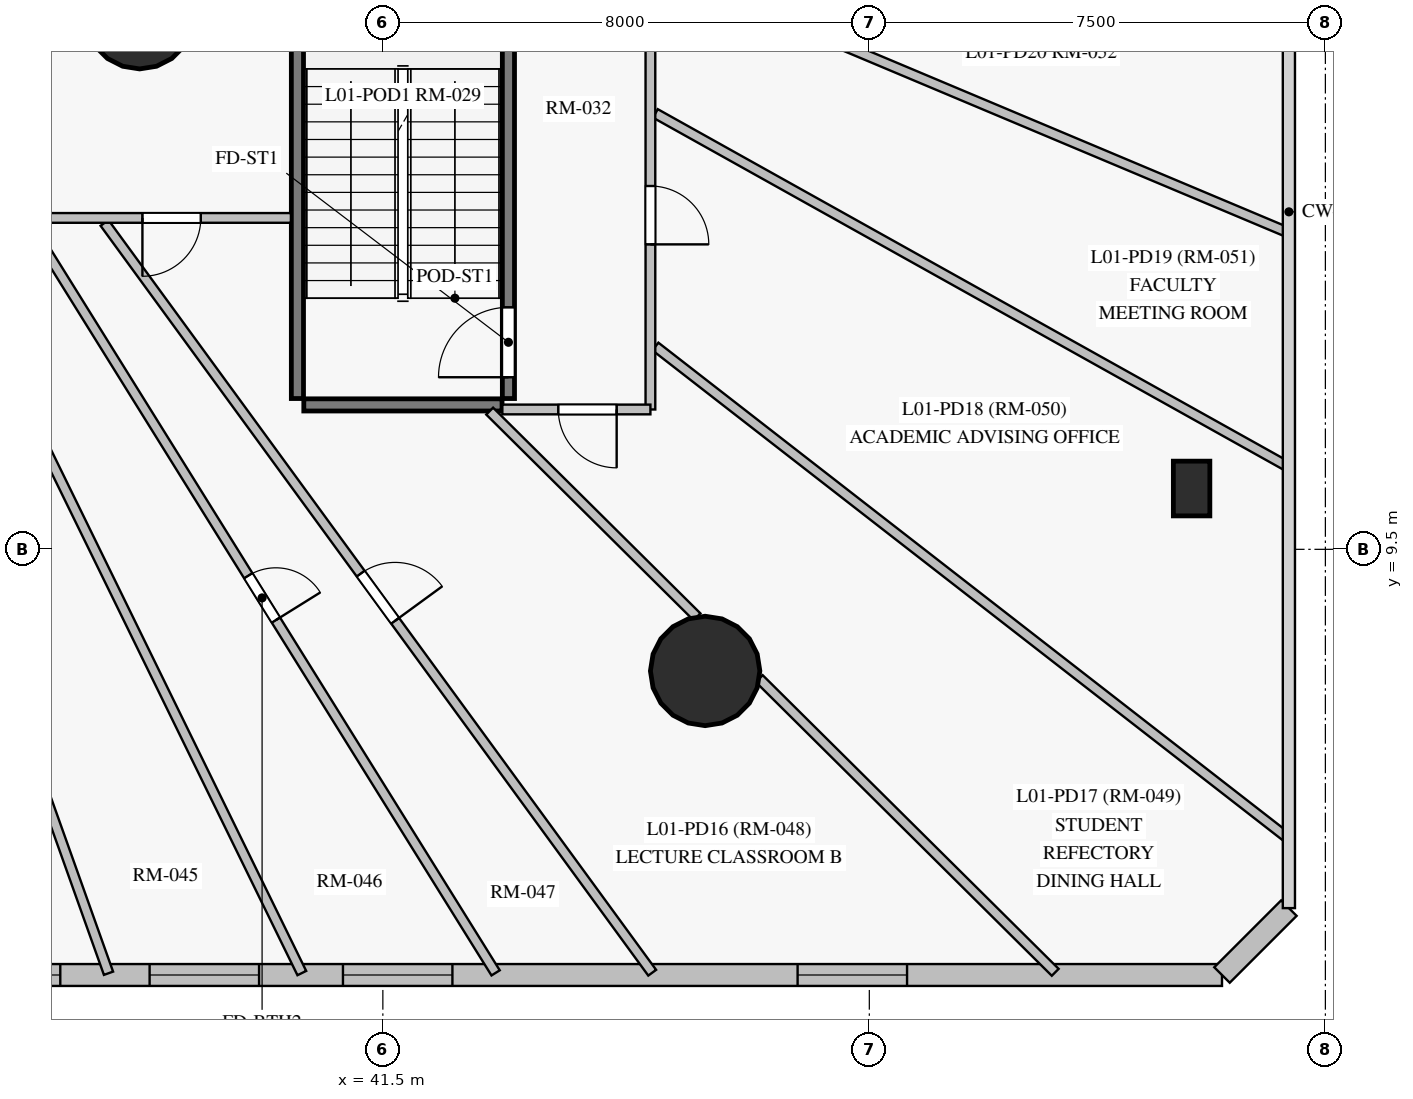
"""IFC4 building model, lengths in metres.
Left out: names, types, materials, properties, quantities, classifications, styles, units other than length and angle.
Written with IfcOpenShell. Run it as: python <this file> out.ifc"""

import sys

from ifc_helpers import new_model, si_unit, direction, frame, frame_2d, origin, origin_with_axes, origin_2d, place, context, subcontext, project, spatial, rectangle, circle, extrude, source, transform, mapped, element, fill, save


model = new_model("IFC4")
c1 = context("Model", 3, precision=1e-05, world=origin(), true_north=direction((0.0, 1.0)))
c2 = subcontext(c1, "Body", "Model", "MODEL_VIEW")
j1 = project(units=[si_unit("LENGTHUNIT", "METRE"), si_unit("PLANEANGLEUNIT", "RADIAN")], contexts=[c1])
p1 = place(None, origin())
s1 = spatial("IfcSite", under=j1, at=p1, CompositionType="ELEMENT")
p2 = place(p1, origin())
s2 = spatial("IfcBuilding", under=s1, at=p2, CompositionType="ELEMENT")
p3 = place(p2, frame((0.0, 0.0, 4.5)))
s3 = spatial("IfcBuildingStorey", under=s2, at=p3, CompositionType="ELEMENT", Elevation=4.5)
m1 = source(origin_with_axes(), c2, "Body", "SweptSolid", [
    extrude(circle(Radius=0.9, at=origin_2d()), origin(), (0.0, 0.0, 1.0), 4.5),
])
for number, where, z_axis, x_axis in (
    (1, (37.5, 18.3, 0.0), (0.0, 0.0, 1.0), (1.0, 0.0, 0.0)),
    (2, (46.8, 7.5, 0.0), (0.0, 0.0, 1.0), (1.0, 0.0, 0.0)),
):
    element("IfcColumn", number, at=place(p3, frame(where, z_axis=z_axis, x_axis=x_axis)), inside=s3, PredefinedType="COLUMN", context=c2, shape_type="MappedRepresentation", body=[
        mapped(m1, transform((0.0, 0.0, 0.0), scale=1.0)),
    ])
m2 = source(origin_with_axes(), c2, "Body", "SweptSolid", [
    extrude(rectangle(XDim=0.6, YDim=0.9, at=origin_2d()), origin(), (0.0, 0.0, 1.0), 4.5),
])
p4 = place(p3, frame((54.8, 10.5, 0.0), z_axis=(0.0, 0.0, 1.0), x_axis=(1.0, 0.0, 0.0)))
e3 = element("IfcColumn", 3, at=p4, inside=s3, PredefinedType="PILASTER", context=c2, shape_type="MappedRepresentation", body=[
    mapped(m2, transform((0.0, 0.0, 0.0), scale=1.0)),
])
p5 = place(p3, frame((3.45, 2.5, 0.0), z_axis=(0.0, 0.0, 1.0), x_axis=(1.0, 0.0, 0.0)))
e4 = element("IfcWall", 4, at=p5, inside=s3, PredefinedType="SOLIDWALL", context=c2, shape_type="SweptSolid", body=[
    extrude(rectangle(XDim=51.85, YDim=0.36, at=frame_2d((25.925, 0.0))), origin(), (0.0, 0.0, 1.0), 4.2),
])
p6 = place(p5, frame((1.516, 0.0, 0.85)))
e5 = element("IfcOpeningElement", 5, at=p6, cuts=e4, PredefinedType="OPENING", context=c2, shape_type="SweptSolid", body=[
    extrude(rectangle(XDim=1.8, YDim=2.2, at=frame_2d((0.9, 1.1))), frame((0.0, 0.19, 0.0), z_axis=(0.0, -1.0, 0.0), x_axis=(1.0, 0.0, 0.0)), (0.0, 0.0, 1.0), 0.38),
])
p7 = place(p5, frame((6.037, 0.0, 0.85)))
e6 = element("IfcOpeningElement", 6, at=p7, cuts=e4, PredefinedType="OPENING", context=c2, shape_type="SweptSolid", body=[
    extrude(rectangle(XDim=1.8, YDim=2.2, at=frame_2d((0.9, 1.1))), frame((0.0, 0.19, 0.0), z_axis=(0.0, -1.0, 0.0), x_axis=(1.0, 0.0, 0.0)), (0.0, 0.0, 1.0), 0.38),
])
p8 = place(p5, frame((12.611, 0.0, 0.85)))
e7 = element("IfcOpeningElement", 7, at=p8, cuts=e4, PredefinedType="OPENING", context=c2, shape_type="SweptSolid", body=[
    extrude(rectangle(XDim=1.8, YDim=2.2, at=frame_2d((0.9, 1.1))), frame((0.0, 0.19, 0.0), z_axis=(0.0, -1.0, 0.0), x_axis=(1.0, 0.0, 0.0)), (0.0, 0.0, 1.0), 0.38),
])
p9 = place(p5, frame((18.95, 0.0, 0.85)))
e8 = element("IfcOpeningElement", 8, at=p9, cuts=e4, PredefinedType="OPENING", context=c2, shape_type="SweptSolid", body=[
    extrude(rectangle(XDim=1.8, YDim=2.2, at=frame_2d((0.9, 1.1))), frame((0.0, 0.19, 0.0), z_axis=(0.0, -1.0, 0.0), x_axis=(1.0, 0.0, 0.0)), (0.0, 0.0, 1.0), 0.38),
])
p10 = place(p5, frame((25.523, 0.0, 0.85)))
e9 = element("IfcOpeningElement", 9, at=p10, cuts=e4, PredefinedType="OPENING", context=c2, shape_type="SweptSolid", body=[
    extrude(rectangle(XDim=1.8, YDim=2.2, at=frame_2d((0.9, 1.1))), frame((0.0, 0.19, 0.0), z_axis=(0.0, -1.0, 0.0), x_axis=(1.0, 0.0, 0.0)), (0.0, 0.0, 1.0), 0.38),
])
p11 = place(p5, frame((30.945, 0.0, 0.85)))
e10 = element("IfcOpeningElement", 10, at=p11, cuts=e4, PredefinedType="OPENING", context=c2, shape_type="SweptSolid", body=[
    extrude(rectangle(XDim=1.8, YDim=2.2, at=frame_2d((0.9, 1.1))), frame((0.0, 0.19, 0.0), z_axis=(0.0, -1.0, 0.0), x_axis=(1.0, 0.0, 0.0)), (0.0, 0.0, 1.0), 0.38),
])
p12 = place(p5, frame((34.214, 0.0, 0.85)))
e11 = element("IfcOpeningElement", 11, at=p12, cuts=e4, PredefinedType="OPENING", context=c2, shape_type="SweptSolid", body=[
    extrude(rectangle(XDim=1.8, YDim=2.2, at=frame_2d((0.9, 1.1))), frame((0.0, 0.19, 0.0), z_axis=(0.0, -1.0, 0.0), x_axis=(1.0, 0.0, 0.0)), (0.0, 0.0, 1.0), 0.38),
])
p13 = place(p5, frame((37.394, 0.0, 0.85)))
e12 = element("IfcOpeningElement", 12, at=p13, cuts=e4, PredefinedType="OPENING", context=c2, shape_type="SweptSolid", body=[
    extrude(rectangle(XDim=1.8, YDim=2.2, at=frame_2d((0.9, 1.1))), frame((0.0, 0.19, 0.0), z_axis=(0.0, -1.0, 0.0), x_axis=(1.0, 0.0, 0.0)), (0.0, 0.0, 1.0), 0.38),
])
p14 = place(p5, frame((44.871, 0.0, 0.85)))
e13 = element("IfcOpeningElement", 13, at=p14, cuts=e4, PredefinedType="OPENING", context=c2, shape_type="SweptSolid", body=[
    extrude(rectangle(XDim=1.8, YDim=2.2, at=frame_2d((0.9, 1.1))), frame((0.0, 0.19, 0.0), z_axis=(0.0, -1.0, 0.0), x_axis=(1.0, 0.0, 0.0)), (0.0, 0.0, 1.0), 0.38),
])
p15 = place(p3, frame((55.3, 2.5, 0.0), z_axis=(0.0, 0.0, 1.0), x_axis=(0.707028305322, 0.707185248342, 0.0)))
e14 = element("IfcWall", 14, at=p15, inside=s3, PredefinedType="SOLIDWALL", context=c2, shape_type="SweptSolid", body=[
    extrude(rectangle(XDim=1.556, YDim=0.36, at=frame_2d((0.778, 0.0))), origin(), (0.0, 0.0, 1.0), 4.2),
])
p16 = place(p3, frame((40.095, 11.98, 0.0), z_axis=(0.0, 0.0, 1.0), x_axis=(0.0, 1.0, 0.0)))
e15 = element("IfcWall", 15, at=p16, inside=s3, PredefinedType="SHEAR", context=c2, shape_type="SweptSolid", body=[
    extrude(rectangle(XDim=7.35, YDim=0.2, at=frame_2d((3.675, 0.0))), origin(), (0.0, 0.0, 1.0), 4.2),
])
p17 = place(p3, frame((43.565, 11.98, 0.0), z_axis=(0.0, 0.0, 1.0), x_axis=(0.0, 1.0, 0.0)))
e16 = element("IfcWall", 16, at=p17, inside=s3, PredefinedType="SHEAR", context=c2, shape_type="SweptSolid", body=[
    extrude(rectangle(XDim=7.35, YDim=0.2, at=frame_2d((3.675, 0.0))), origin(), (0.0, 0.0, 1.0), 4.2),
])
p18 = place(p17, frame((0.35, 0.0, 0.0)))
e17 = element("IfcOpeningElement", 17, at=p18, cuts=e16, PredefinedType="OPENING", context=c2, shape_type="SweptSolid", body=[
    extrude(rectangle(XDim=1.15, YDim=2.15, at=frame_2d((0.575, 1.075))), frame((0.0, 0.11, 0.0), z_axis=(0.0, -1.0, 0.0), x_axis=(1.0, 0.0, 0.0)), (0.0, 0.0, 1.0), 0.22),
])
p19 = place(p3, frame((40.2, 11.875, 0.0), z_axis=(0.0, 0.0, 1.0), x_axis=(1.0, 0.0, 0.0)))
e18 = element("IfcWall", 18, at=p19, inside=s3, PredefinedType="SHEAR", context=c2, shape_type="SweptSolid", body=[
    extrude(rectangle(XDim=3.26, YDim=0.2, at=frame_2d((1.63, 0.0))), origin(), (0.0, 0.0, 1.0), 4.2),
])
p20 = place(p3, frame((40.918, 21.214, 0.0), z_axis=(0.0, 0.0, 1.0), x_axis=(0.921837584327, -0.387576402947, 0.0)))
e19 = element("IfcWall", 19, at=p20, inside=s3, PredefinedType="PARTITIONING", context=c2, shape_type="SweptSolid", body=[
    extrude(rectangle(XDim=16.762, YDim=0.16, at=frame_2d((8.381, 0.0))), origin(), (0.0, 0.0, 1.0), 4.2),
])
p21 = place(p20, frame((7.881, 0.0, 0.0)))
e20 = element("IfcOpeningElement", 20, at=p21, cuts=e19, PredefinedType="OPENING", context=c2, shape_type="SweptSolid", body=[
    extrude(rectangle(XDim=0.96, YDim=2.15, at=frame_2d((0.48, 1.075))), frame((0.0, 0.09, 0.0), z_axis=(0.0, -1.0, 0.0), x_axis=(1.0, 0.0, 0.0)), (0.0, 0.0, 1.0), 0.18),
])
p22 = place(p3, frame((36.923, 14.868, 0.0), z_axis=(0.0, 0.0, 1.0), x_axis=(0.589855025389, -0.80750916343, 0.0)))
e21 = element("IfcWall", 21, at=p22, inside=s3, PredefinedType="PARTITIONING", context=c2, shape_type="SweptSolid", body=[
    extrude(rectangle(XDim=15.27, YDim=0.16, at=frame_2d((7.635, 0.0))), origin(), (0.0, 0.0, 1.0), 4.2),
])
p23 = place(p22, frame((7.142, 0.0, 0.0)))
e22 = element("IfcOpeningElement", 22, at=p23, cuts=e21, PredefinedType="OPENING", context=c2, shape_type="SweptSolid", body=[
    extrude(rectangle(XDim=0.96, YDim=2.15, at=frame_2d((0.48, 1.075))), frame((0.0, 0.09, 0.0), z_axis=(0.0, -1.0, 0.0), x_axis=(1.0, 0.0, 0.0)), (0.0, 0.0, 1.0), 0.18),
])
p24 = place(p3, frame((35.674, 14.868, 0.0), z_axis=(0.0, 0.0, 1.0), x_axis=(0.528650980247, -0.848839290492, 0.0)))
e23 = element("IfcWall", 23, at=p24, inside=s3, PredefinedType="PARTITIONING", context=c2, shape_type="SweptSolid", body=[
    extrude(rectangle(XDim=14.529, YDim=0.16, at=frame_2d((7.265, 0.0))), origin(), (0.0, 0.0, 1.0), 4.2),
])
p25 = place(p24, frame((6.835, 0.0, 0.0)))
e24 = element("IfcOpeningElement", 24, at=p25, cuts=e23, PredefinedType="OPENING", context=c2, shape_type="SweptSolid", body=[
    extrude(rectangle(XDim=0.86, YDim=2.04, at=frame_2d((0.43, 1.02))), frame((0.0, 0.09, 0.0), z_axis=(0.0, -1.0, 0.0), x_axis=(1.0, 0.0, 0.0)), (0.0, 0.0, 1.0), 0.18),
])
p26 = place(p3, frame((39.988, 14.95, 0.0), z_axis=(0.0, 0.0, 1.0), x_axis=(-1.0, 0.0, 0.0)))
e25 = element("IfcWall", 25, at=p26, inside=s3, PredefinedType="PARTITIONING", context=c2, shape_type="SweptSolid", body=[
    extrude(rectangle(XDim=14.588, YDim=0.16, at=frame_2d((7.294, 0.0))), origin(), (0.0, 0.0, 1.0), 4.2),
])
p27 = place(p26, frame((10.34, 0.0, 0.0)))
e26 = element("IfcOpeningElement", 26, at=p27, cuts=e25, PredefinedType="OPENING", context=c2, shape_type="SweptSolid", body=[
    extrude(rectangle(XDim=0.96, YDim=2.15, at=frame_2d((0.48, 1.075))), frame((0.0, 0.09, 0.0), z_axis=(0.0, -1.0, 0.0), x_axis=(1.0, 0.0, 0.0)), (0.0, 0.0, 1.0), 0.18),
])
p28 = place(p26, frame((7.808, 0.0, 0.0)))
e27 = element("IfcOpeningElement", 27, at=p28, cuts=e25, PredefinedType="OPENING", context=c2, shape_type="SweptSolid", body=[
    extrude(rectangle(XDim=0.96, YDim=2.15, at=frame_2d((0.48, 1.075))), frame((0.0, 0.09, 0.0), z_axis=(0.0, -1.0, 0.0), x_axis=(1.0, 0.0, 0.0)), (0.0, 0.0, 1.0), 0.18),
])
p29 = place(p26, frame((6.145, 0.0, 0.0)))
e28 = element("IfcOpeningElement", 28, at=p29, cuts=e25, PredefinedType="OPENING", context=c2, shape_type="SweptSolid", body=[
    extrude(rectangle(XDim=0.96, YDim=2.15, at=frame_2d((0.48, 1.075))), frame((0.0, 0.09, 0.0), z_axis=(0.0, -1.0, 0.0), x_axis=(1.0, 0.0, 0.0)), (0.0, 0.0, 1.0), 0.18),
])
p30 = place(p26, frame((1.482, 0.0, 0.0)))
e29 = element("IfcOpeningElement", 29, at=p30, cuts=e25, PredefinedType="OPENING", context=c2, shape_type="SweptSolid", body=[
    extrude(rectangle(XDim=0.96, YDim=2.15, at=frame_2d((0.48, 1.075))), frame((0.0, 0.09, 0.0), z_axis=(0.0, -1.0, 0.0), x_axis=(1.0, 0.0, 0.0)), (0.0, 0.0, 1.0), 0.18),
])
p31 = place(p26, frame((12.07, 0.0, 0.0)))
e30 = element("IfcOpeningElement", 30, at=p31, cuts=e25, PredefinedType="OPENING", context=c2, shape_type="SweptSolid", body=[
    extrude(rectangle(XDim=0.96, YDim=2.15, at=frame_2d((0.48, 1.075))), frame((0.0, 0.09, 0.0), z_axis=(0.0, -1.0, 0.0), x_axis=(1.0, 0.0, 0.0)), (0.0, 0.0, 1.0), 0.18),
])
p32 = place(p3, frame((34.121, 14.882, 0.0), z_axis=(0.0, 0.0, 1.0), x_axis=(0.439712558425, -0.898138556105, 0.0)))
e31 = element("IfcWall", 31, at=p32, inside=s3, PredefinedType="PARTITIONING", context=c2, shape_type="SweptSolid", body=[
    extrude(rectangle(XDim=13.751, YDim=0.16, at=frame_2d((6.875, 0.0))), origin(), (0.0, 0.0, 1.0), 4.2),
])
p33 = place(p3, frame((45.982, 12.836, 0.0), z_axis=(0.0, 0.0, 1.0), x_axis=(0.789554176815, -0.613680863214, 0.0)))
e32 = element("IfcWall", 32, at=p33, inside=s3, PredefinedType="PARTITIONING", context=c2, shape_type="SweptSolid", body=[
    extrude(rectangle(XDim=13.146, YDim=0.16, at=frame_2d((6.573, 0.0))), origin(), (0.0, 0.0, 1.0), 4.2),
])
p34 = place(p3, frame((32.586, 14.868, 0.0), z_axis=(0.0, 0.0, 1.0), x_axis=(0.336016454354, -0.941856115552, 0.0)))
e33 = element("IfcWall", 33, at=p34, inside=s3, PredefinedType="PARTITIONING", context=c2, shape_type="SweptSolid", body=[
    extrude(rectangle(XDim=13.101, YDim=0.16, at=frame_2d((6.55, 0.0))), origin(), (0.0, 0.0, 1.0), 4.2),
])
p35 = place(p34, frame((6.058, 0.0, 0.0)))
e34 = element("IfcOpeningElement", 34, at=p35, cuts=e33, PredefinedType="OPENING", context=c2, shape_type="SweptSolid", body=[
    extrude(rectangle(XDim=0.96, YDim=2.15, at=frame_2d((0.48, 1.075))), frame((0.0, 0.09, 0.0), z_axis=(0.0, -1.0, 0.0), x_axis=(1.0, 0.0, 0.0)), (0.0, 0.0, 1.0), 0.18),
])
p36 = place(p3, frame((45.982, 16.669, 0.0), z_axis=(0.0, 0.0, 1.0), x_axis=(0.873084325339, -0.487569236978, 0.0)))
e35 = element("IfcWall", 35, at=p36, inside=s3, PredefinedType="PARTITIONING", context=c2, shape_type="SweptSolid", body=[
    extrude(rectangle(XDim=11.894, YDim=0.16, at=frame_2d((5.947, 0.0))), origin(), (0.0, 0.0, 1.0), 4.2),
])
p37 = place(p3, frame((47.69, 7.374, 0.0), z_axis=(0.0, 0.0, 1.0), x_axis=(0.709842997922, -0.70435993519, 0.0)))
e36 = element("IfcWall", 36, at=p37, inside=s3, PredefinedType="PARTITIONING", context=c2, shape_type="SweptSolid", body=[
    extrude(rectangle(XDim=6.857, YDim=0.16, at=frame_2d((3.428, 0.0))), origin(), (0.0, 0.0, 1.0), 4.2),
])
p38 = place(p3, frame((45.9, 18.2, 0.0), z_axis=(0.0, 0.0, 1.0), x_axis=(0.0, -1.0, 0.0)))
e37 = element("IfcWall", 37, at=p38, inside=s3, PredefinedType="PARTITIONING", context=c2, shape_type="SweptSolid", body=[
    extrude(rectangle(XDim=6.4, YDim=0.16, at=frame_2d((3.2, 0.0))), origin(), (0.0, 0.0, 1.0), 4.2),
])
p39 = place(p38, frame((2.725, 0.0, 0.0)))
e38 = element("IfcOpeningElement", 38, at=p39, cuts=e37, PredefinedType="OPENING", context=c2, shape_type="SweptSolid", body=[
    extrude(rectangle(XDim=0.96, YDim=2.15, at=frame_2d((0.48, 1.075))), frame((0.0, 0.09, 0.0), z_axis=(0.0, -1.0, 0.0), x_axis=(1.0, 0.0, 0.0)), (0.0, 0.0, 1.0), 0.18),
])
p40 = place(p3, frame((43.257, 11.773, 0.0), z_axis=(0.0, 0.0, 1.0), x_axis=(0.709846294383, -0.704356613052, 0.0)))
e39 = element("IfcWall", 39, at=p40, inside=s3, PredefinedType="PARTITIONING", context=c2, shape_type="SweptSolid", body=[
    extrude(rectangle(XDim=4.803, YDim=0.16, at=frame_2d((2.401, 0.0))), origin(), (0.0, 0.0, 1.0), 3.25),
])
p41 = place(p3, frame((45.9, 11.8, 0.0), z_axis=(0.0, 0.0, 1.0), x_axis=(-1.0, 0.0, 0.0)))
e40 = element("IfcWall", 40, at=p41, inside=s3, PredefinedType="PARTITIONING", context=c2, shape_type="SweptSolid", body=[
    extrude(rectangle(XDim=2.435, YDim=0.16, at=frame_2d((1.217, 0.0))), origin(), (0.0, 0.0, 1.0), 4.2),
])
p42 = place(p41, frame((0.555, 0.0, 0.0)))
e41 = element("IfcOpeningElement", 41, at=p42, cuts=e40, PredefinedType="OPENING", context=c2, shape_type="SweptSolid", body=[
    extrude(rectangle(XDim=0.96, YDim=2.15, at=frame_2d((0.48, 1.075))), frame((0.0, 0.09, 0.0), z_axis=(0.0, -1.0, 0.0), x_axis=(1.0, 0.0, 0.0)), (0.0, 0.0, 1.0), 0.18),
])
m3 = source(origin_with_axes(), c2, "Body", "SweptSolid", [
    extrude(rectangle(XDim=1.8, YDim=2.2, at=frame_2d((0.9, 1.1))), frame((0.0, 0.03, 0.0), z_axis=(0.0, -1.0, 0.0), x_axis=(1.0, 0.0, 0.0)), (0.0, 0.0, 1.0), 0.06),
])
p43 = place(p11, origin())
e42 = element("IfcWindow", 42, at=p43, inside=s3, PartitioningType="SINGLE_PANEL", PredefinedType="WINDOW", context=c2, shape_type="MappedRepresentation", body=[
    mapped(m3, transform((0.0, 0.0, 0.0), scale=1.0)),
])
fill(e10, e42)
p44 = place(p12, origin())
e43 = element("IfcWindow", 43, at=p44, inside=s3, PartitioningType="SINGLE_PANEL", PredefinedType="WINDOW", context=c2, shape_type="MappedRepresentation", body=[
    mapped(m3, transform((0.0, 0.0, 0.0), scale=1.0)),
])
fill(e11, e43)
p45 = place(p13, origin())
e44 = element("IfcWindow", 44, at=p45, inside=s3, PartitioningType="SINGLE_PANEL", PredefinedType="WINDOW", context=c2, shape_type="MappedRepresentation", body=[
    mapped(m3, transform((0.0, 0.0, 0.0), scale=1.0)),
])
fill(e12, e44)
p46 = place(p14, origin())
e45 = element("IfcWindow", 45, at=p46, inside=s3, PartitioningType="SINGLE_PANEL", PredefinedType="WINDOW", context=c2, shape_type="MappedRepresentation", body=[
    mapped(m3, transform((0.0, 0.0, 0.0), scale=1.0)),
])
fill(e13, e45)
m4 = source(origin_with_axes(), c2, "Body", "SweptSolid", [
    extrude(rectangle(XDim=1.15, YDim=2.15, at=frame_2d((0.575, 1.075))), frame((0.0, 0.025, 0.0), z_axis=(0.0, -1.0, 0.0), x_axis=(1.0, 0.0, 0.0)), (0.0, 0.0, 1.0), 0.05),
])
p47 = place(p18, origin())
e46 = element("IfcDoor", 46, at=p47, inside=s3, OperationType="SINGLE_SWING_LEFT", PredefinedType="DOOR", context=c2, shape_type="MappedRepresentation", body=[
    mapped(m4, transform((0.0, 0.0, 0.0), scale=1.0)),
])
fill(e17, e46)
m5 = source(origin_with_axes(), c2, "Body", "SweptSolid", [
    extrude(rectangle(XDim=0.96, YDim=2.15, at=frame_2d((0.48, 1.075))), frame((0.0, 0.025, 0.0), z_axis=(0.0, -1.0, 0.0), x_axis=(1.0, 0.0, 0.0)), (0.0, 0.0, 1.0), 0.05),
])
p48 = place(p30, origin())
e47 = element("IfcDoor", 47, at=p48, inside=s3, OperationType="SINGLE_SWING_RIGHT", PredefinedType="DOOR", context=c2, shape_type="MappedRepresentation", body=[
    mapped(m5, transform((0.0, 0.0, 0.0), scale=1.0)),
])
fill(e29, e47)
p49 = place(p23, origin())
e48 = element("IfcDoor", 48, at=p49, inside=s3, OperationType="SINGLE_SWING_RIGHT", PredefinedType="DOOR", context=c2, shape_type="MappedRepresentation", body=[
    mapped(m5, transform((0.0, 0.0, 0.0), scale=1.0)),
])
fill(e22, e48)
p50 = place(p42, origin())
e49 = element("IfcDoor", 49, at=p50, inside=s3, OperationType="SINGLE_SWING_LEFT", PredefinedType="DOOR", context=c2, shape_type="MappedRepresentation", body=[
    mapped(m5, transform((0.0, 0.0, 0.0), scale=1.0)),
])
fill(e41, e49)
p51 = place(p39, origin())
e50 = element("IfcDoor", 50, at=p51, inside=s3, OperationType="SINGLE_SWING_RIGHT", PredefinedType="DOOR", context=c2, shape_type="MappedRepresentation", body=[
    mapped(m5, transform((0.0, 0.0, 0.0), scale=1.0)),
])
fill(e38, e50)
m6 = source(origin_with_axes(), c2, "Body", "SweptSolid", [
    extrude(rectangle(XDim=0.86, YDim=2.04, at=frame_2d((0.43, 1.02))), frame((0.0, 0.025, 0.0), z_axis=(0.0, -1.0, 0.0), x_axis=(1.0, 0.0, 0.0)), (0.0, 0.0, 1.0), 0.05),
])
p52 = place(p25, origin())
e51 = element("IfcDoor", 51, at=p52, inside=s3, OperationType="SINGLE_SWING_RIGHT", PredefinedType="DOOR", context=c2, shape_type="MappedRepresentation", body=[
    mapped(m6, transform((0.0, 0.0, 0.0), scale=1.0)),
])
fill(e24, e51)
save(model, sys.argv[1])
